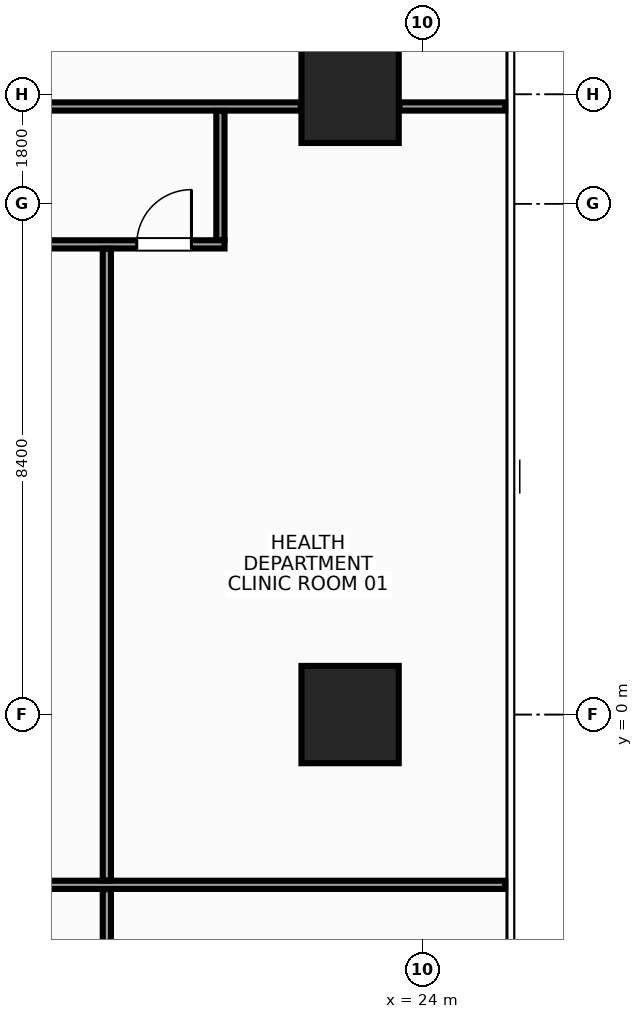
"""IFC4 building model, lengths in metres.
Left out: names, types, materials, properties, quantities, classifications, styles, units other than length and angle.
Written with IfcOpenShell. Run it as: python <this file> out.ifc"""

import sys

from ifc_helpers import new_model, si_unit, direction, frame, frame_2d, origin, origin_2d, place, context, subcontext, project, spatial, rectangle, extrude, source, transform, mapped, element, fill, save


model = new_model("IFC4")
c1 = context("Model", 3, precision=1e-05, world=origin(), true_north=direction((0.0, 1.0)))
c2 = subcontext(c1, "Body", "Model", "MODEL_VIEW")
j1 = project(units=[si_unit("LENGTHUNIT", "METRE"), si_unit("PLANEANGLEUNIT", "RADIAN")], contexts=[c1])
p1 = place(None, origin())
s1 = spatial("IfcSite", under=j1, at=p1, CompositionType="ELEMENT")
p2 = place(p1, origin())
s2 = spatial("IfcBuilding", under=s1, at=p2, CompositionType="ELEMENT")
p3 = place(p2, frame((0.0, 0.0, 77.6)))
s3 = spatial("IfcBuildingStorey", under=s2, at=p3, CompositionType="ELEMENT", Elevation=77.6)
m1 = source(origin(), c2, "Body", "SweptSolid", [
    extrude(rectangle(XDim=1.6, YDim=1.6, at=origin_2d()), origin(), (0.0, 0.0, 1.0), 3.6),
])
for number, where, z_axis, x_axis in (
    (1, (22.8, 0.0, 0.0), (0.0, 0.0, 1.0), (1.0, 0.0, 0.0)),
    (2, (22.8, 10.2, 0.0), (0.0, 0.0, 1.0), (1.0, 0.0, 0.0)),
):
    element("IfcColumn", number, at=place(p3, frame(where, z_axis=z_axis, x_axis=x_axis)), inside=s3, PredefinedType="COLUMN", context=c2, shape_type="MappedRepresentation", body=[
        mapped(m1, transform((0.0, 0.0, 0.0), x_axis=(1.0, 0.0, 0.0), y_axis=(0.0, 1.0, 0.0), z_axis=(0.0, 0.0, 1.0), scale=1.0)),
    ])
m2 = source(origin(), c2, "Body", "SweptSolid", [
    extrude(rectangle(XDim=4.38, YDim=0.135, at=frame_2d((2.19, 0.0))), origin(), (0.0, 0.0, 1.0), 2.745),
])
p4 = place(p3, frame((17.61, 10.0, 0.0), z_axis=(0.0, 0.0, 1.0), x_axis=(1.0, 0.0, 0.0)))
e3 = element("IfcWall", 3, at=p4, inside=s3, PredefinedType="PARTITIONING", context=c2, shape_type="MappedRepresentation", body=[
    mapped(m2, transform((0.0, 0.0, 0.0), x_axis=(1.0, 0.0, 0.0), y_axis=(0.0, 1.0, 0.0), z_axis=(0.0, 0.0, 1.0), scale=1.0)),
])
m3 = source(origin(), c2, "Body", "SweptSolid", [
    extrude(rectangle(XDim=1.74, YDim=0.135, at=frame_2d((0.87, 0.0))), origin(), (0.0, 0.0, 1.0), 3.36),
])
p5 = place(p3, frame((23.61, 10.0, 0.0), z_axis=(0.0, 0.0, 1.0), x_axis=(1.0, 0.0, 0.0)))
e4 = element("IfcWall", 4, at=p5, inside=s3, PredefinedType="PARTITIONING", context=c2, shape_type="MappedRepresentation", body=[
    mapped(m3, transform((0.0, 0.0, 0.0), x_axis=(1.0, 0.0, 0.0), y_axis=(0.0, 1.0, 0.0), z_axis=(0.0, 0.0, 1.0), scale=1.0)),
])
m4 = source(origin(), c2, "Body", "SweptSolid", [
    extrude(rectangle(XDim=22.3, YDim=0.135, at=frame_2d((11.15, 0.0))), origin(), (0.0, 0.0, 1.0), 2.745),
])
p6 = place(p3, frame((-1.565, 7.732, 0.0), z_axis=(0.0, 0.0, 1.0), x_axis=(1.0, 0.0, 0.0)))
e5 = element("IfcWall", 5, at=p6, inside=s3, PredefinedType="PARTITIONING", context=c2, shape_type="MappedRepresentation", body=[
    mapped(m4, transform((0.0, 0.0, 0.0), x_axis=(1.0, 0.0, 0.0), y_axis=(0.0, 1.0, 0.0), z_axis=(0.0, 0.0, 1.0), scale=1.0)),
])
p7 = place(p6, frame((20.856, 0.0, 0.0)))
e6 = element("IfcOpeningElement", 6, at=p7, cuts=e5, PredefinedType="OPENING", context=c2, shape_type="SweptSolid", body=[
    extrude(rectangle(XDim=0.9, YDim=2.15, at=frame_2d((0.45, 1.075))), frame((0.0, 0.08, 0.0), z_axis=(0.0, -1.0, 0.0), x_axis=(1.0, 0.0, 0.0)), (0.0, 0.0, 1.0), 0.159),
])
p8 = place(p6, frame((0.784, 0.0, 0.0)))
e7 = element("IfcOpeningElement", 7, at=p8, cuts=e5, PredefinedType="OPENING", context=c2, shape_type="SweptSolid", body=[
    extrude(rectangle(XDim=1.65, YDim=2.35, at=frame_2d((0.825, 1.175))), frame((0.0, 0.08, 0.0), z_axis=(0.0, -1.0, 0.0), x_axis=(1.0, 0.0, 0.0)), (0.0, 0.0, 1.0), 0.159),
])
p9 = place(p6, frame((15.34, 0.0, 0.0)))
e8 = element("IfcOpeningElement", 8, at=p9, cuts=e5, PredefinedType="OPENING", context=c2, shape_type="SweptSolid", body=[
    extrude(rectangle(XDim=1.65, YDim=2.35, at=frame_2d((0.825, 1.175))), frame((0.0, 0.08, 0.0), z_axis=(0.0, -1.0, 0.0), x_axis=(1.0, 0.0, 0.0)), (0.0, 0.0, 1.0), 0.159),
])
p10 = place(p6, frame((5.64, 0.0, 0.0)))
e9 = element("IfcOpeningElement", 9, at=p10, cuts=e5, PredefinedType="OPENING", context=c2, shape_type="SweptSolid", body=[
    extrude(rectangle(XDim=1.65, YDim=2.35, at=frame_2d((0.825, 1.175))), frame((0.0, 0.08, 0.0), z_axis=(0.0, -1.0, 0.0), x_axis=(1.0, 0.0, 0.0)), (0.0, 0.0, 1.0), 0.159),
])
m5 = source(origin(), c2, "Body", "SweptSolid", [
    extrude(rectangle(XDim=2.123, YDim=0.135, at=frame_2d((1.061, 0.0))), origin(), (0.0, 0.0, 1.0), 3.36),
])
p11 = place(p3, frame((20.667, 7.805, 0.0), z_axis=(0.0, 0.0, 1.0), x_axis=(0.0, 1.0, 0.0)))
e10 = element("IfcWall", 10, at=p11, inside=s3, PredefinedType="PARTITIONING", context=c2, shape_type="MappedRepresentation", body=[
    mapped(m5, transform((0.0, 0.0, 0.0), x_axis=(1.0, 0.0, 0.0), y_axis=(0.0, 1.0, 0.0), z_axis=(0.0, 0.0, 1.0), scale=1.0)),
])
m6 = source(origin(), c2, "Body", "SweptSolid", [
    extrude(rectangle(XDim=26.91, YDim=0.135, at=frame_2d((13.455, 0.0))), origin(), (0.0, 0.0, 1.0), 2.745),
])
p12 = place(p3, frame((-1.56, -2.8, 0.0), z_axis=(0.0, 0.0, 1.0), x_axis=(1.0, 0.0, 0.0)))
e11 = element("IfcWall", 11, at=p12, inside=s3, PredefinedType="PARTITIONING", context=c2, shape_type="MappedRepresentation", body=[
    mapped(m6, transform((0.0, 0.0, 0.0), x_axis=(1.0, 0.0, 0.0), y_axis=(0.0, 1.0, 0.0), z_axis=(0.0, 0.0, 1.0), scale=1.0)),
])
m7 = source(origin(), c2, "Body", "SweptSolid", [
    extrude(rectangle(XDim=10.387, YDim=0.135, at=frame_2d((5.194, 0.0))), origin(), (0.0, 0.0, 1.0), 2.745),
])
p13 = place(p3, frame((18.8, -2.728, 0.0), z_axis=(0.0, 0.0, 1.0), x_axis=(0.0, 1.0, 0.0)))
e12 = element("IfcWall", 12, at=p13, inside=s3, PredefinedType="PARTITIONING", context=c2, shape_type="MappedRepresentation", body=[
    mapped(m7, transform((0.0, 0.0, 0.0), x_axis=(1.0, 0.0, 0.0), y_axis=(0.0, 1.0, 0.0), z_axis=(0.0, 0.0, 1.0), scale=1.0)),
])
m8 = source(origin(), c2, "Body", "SweptSolid", [
    extrude(rectangle(XDim=5.787, YDim=0.135, at=frame_2d((2.894, 0.0))), origin(), (0.0, 0.0, 1.0), 3.36),
])
p14 = place(p3, frame((18.8, -8.66, 0.0), z_axis=(0.0, 0.0, 1.0), x_axis=(0.0, 1.0, 0.0)))
e13 = element("IfcWall", 13, at=p14, inside=s3, PredefinedType="PARTITIONING", context=c2, shape_type="MappedRepresentation", body=[
    mapped(m8, transform((0.0, 0.0, 0.0), x_axis=(1.0, 0.0, 0.0), y_axis=(0.0, 1.0, 0.0), z_axis=(0.0, 0.0, 1.0), scale=1.0)),
])
m9 = source(origin(), c2, "Body", "SweptSolid", [
    extrude(rectangle(XDim=0.9, YDim=2.15, at=frame_2d((0.45, 1.075))), frame((0.0, 0.025, 0.0), z_axis=(0.0, -1.0, 0.0), x_axis=(1.0, 0.0, 0.0)), (0.0, 0.0, 1.0), 0.05),
])
p15 = place(p7, origin())
e14 = element("IfcDoor", 14, at=p15, inside=s3, OperationType="SINGLE_SWING_RIGHT", PredefinedType="DOOR", context=c2, shape_type="MappedRepresentation", body=[
    mapped(m9, transform((0.0, 0.0, 0.0), x_axis=(1.0, 0.0, 0.0), y_axis=(0.0, 1.0, 0.0), z_axis=(0.0, 0.0, 1.0), scale=1.0)),
])
fill(e6, e14)
save(model, sys.argv[1])
